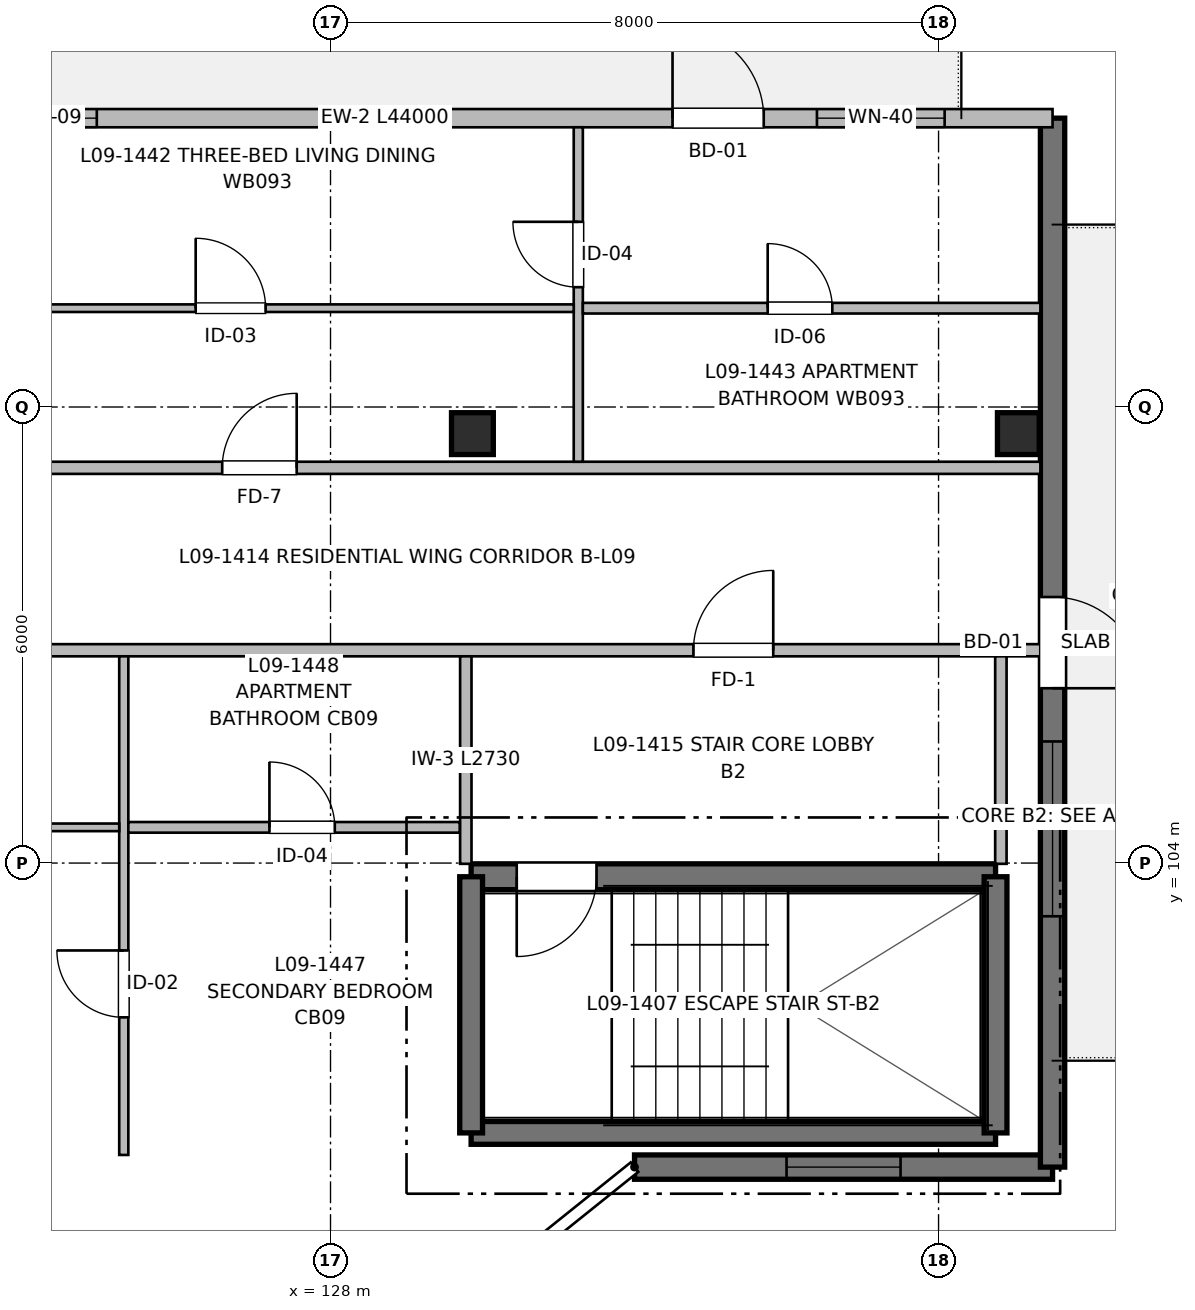
"""IFC4 building model, lengths in metres.
Left out: names, types, materials, properties, quantities, classifications, styles, units other than length and angle.
Written with IfcOpenShell. Run it as: python <this file> out.ifc"""

import sys

from ifc_helpers import new_model, si_unit, direction, frame, frame_2d, origin, origin_2d, place, context, subcontext, project, spatial, rectangle, extrude, element, fill, save


model = new_model("IFC4")
c1 = context("Model", 3, precision=1e-05, world=origin(), true_north=direction((0.0, 1.0)))
c2 = subcontext(c1, "Body", "Model", "MODEL_VIEW")
j1 = project(units=[si_unit("LENGTHUNIT", "METRE"), si_unit("PLANEANGLEUNIT", "RADIAN")], contexts=[c1])
p1 = place(None, origin())
s1 = spatial("IfcSite", under=j1, at=p1, CompositionType="ELEMENT")
p2 = place(p1, origin())
s2 = spatial("IfcBuilding", under=s1, at=p2, CompositionType="ELEMENT")
p3 = place(p2, frame((0.0, 0.0, 29.76)))
s3 = spatial("IfcBuildingStorey", under=s2, at=p3, CompositionType="ELEMENT", Elevation=29.76)
for number, where, z_axis, x_axis in (
    (1, (129.867, 109.65, 0.0), (0.0, 0.0, 1.0), (1.0, 0.0, 0.0)),
    (2, (137.05, 109.65, 0.0), (0.0, 0.0, 1.0), (1.0, 0.0, 0.0)),
):
    element("IfcColumn", number, at=place(p3, frame(where, z_axis=z_axis, x_axis=x_axis)), inside=s3, PredefinedType="COLUMN", context=c2, shape_type="SweptSolid", body=[
        extrude(rectangle(XDim=0.55, YDim=0.55, at=origin_2d()), origin(), (0.0, 0.0, 1.0), 3.2),
    ])
p4 = place(p3, frame((129.85, 100.45, 0.0), z_axis=(0.0, 0.0, 1.0), x_axis=(1.0, 0.0, 0.0)))
e3 = element("IfcWall", 3, at=p4, inside=s3, PredefinedType="SHEAR", context=c2, shape_type="SweptSolid", body=[
    extrude(rectangle(XDim=6.9, YDim=0.3, at=frame_2d((3.45, 0.0))), origin(), (0.0, 0.0, 1.0), 3.2),
])
p5 = place(p3, frame((136.75, 103.82, 0.0), z_axis=(0.0, 0.0, 1.0), x_axis=(-1.0, 0.0, 0.0)))
e4 = element("IfcWall", 4, at=p5, inside=s3, PredefinedType="SHEAR", context=c2, shape_type="SweptSolid", body=[
    extrude(rectangle(XDim=6.9, YDim=0.34, at=frame_2d((3.45, 0.0))), origin(), (0.0, 0.0, 1.0), 3.2),
])
p6 = place(p5, frame((5.25, 0.0, 0.0)))
e5 = element("IfcOpeningElement", 5, at=p6, cuts=e4, PredefinedType="OPENING", context=c2, shape_type="SweptSolid", body=[
    extrude(rectangle(XDim=1.05, YDim=2.15, at=frame_2d((0.525, 1.075))), frame((0.0, 0.18, 0.0), z_axis=(0.0, -1.0, 0.0), x_axis=(1.0, 0.0, 0.0)), (0.0, 0.0, 1.0), 0.36),
])
for number, where, z_axis, x_axis in (
    (6, (129.85, 103.82, 0.0), (0.0, 0.0, 1.0), (0.0, -1.0, 0.0)),
    (7, (136.75, 100.45, 0.0), (0.0, 0.0, 1.0), (0.0, 1.0, 0.0)),
):
    element("IfcWall", number, at=place(p3, frame(where, z_axis=z_axis, x_axis=x_axis)), inside=s3, PredefinedType="SHEAR", context=c2, shape_type="SweptSolid", body=[
        extrude(rectangle(XDim=3.37, YDim=0.3, at=frame_2d((1.685, 0.0))), origin(), (0.0, 0.0, 1.0), 3.2),
    ])
p7 = place(p3, frame((137.5, 100.0, 0.0), z_axis=(0.0, 0.0, 1.0), x_axis=(-1.0, 0.0, 0.0)))
e8 = element("IfcWall", 8, at=p7, inside=s3, PredefinedType="SHEAR", context=c2, shape_type="SweptSolid", body=[
    extrude(rectangle(XDim=5.5, YDim=0.32, at=frame_2d((2.75, 0.0))), origin(), (0.0, 0.0, 1.0), 2.98),
])
p8 = place(p7, frame((2.0, 0.0, 0.82)))
e9 = element("IfcOpeningElement", 9, at=p8, cuts=e8, PredefinedType="OPENING", context=c2, shape_type="SweptSolid", body=[
    extrude(rectangle(XDim=1.5, YDim=1.4, at=frame_2d((0.75, 0.7))), frame((0.0, 0.17, 0.0), z_axis=(0.0, -1.0, 0.0), x_axis=(1.0, 0.0, 0.0)), (0.0, 0.0, 1.0), 0.34),
])
p9 = place(p3, frame((137.5, 113.8, 0.0), z_axis=(0.0, 0.0, 1.0), x_axis=(0.0, -1.0, 0.0)))
e10 = element("IfcWall", 10, at=p9, inside=s3, PredefinedType="SHEAR", context=c2, shape_type="SweptSolid", body=[
    extrude(rectangle(XDim=13.8, YDim=0.32, at=frame_2d((6.9, 0.0))), origin(), (0.0, 0.0, 1.0), 2.98),
])
p10 = place(p9, frame((6.3, 0.0, 0.0)))
e11 = element("IfcOpeningElement", 11, at=p10, cuts=e10, PredefinedType="OPENING", context=c2, shape_type="SweptSolid", body=[
    extrude(rectangle(XDim=1.2, YDim=2.2, at=frame_2d((0.6, 1.1))), frame((0.0, 0.17, 0.0), z_axis=(0.0, -1.0, 0.0), x_axis=(1.0, 0.0, 0.0)), (0.0, 0.0, 1.0), 0.34),
])
p11 = place(p9, frame((8.2, 0.0, 0.57)))
e12 = element("IfcOpeningElement", 12, at=p11, cuts=e10, PredefinedType="OPENING", context=c2, shape_type="SweptSolid", body=[
    extrude(rectangle(XDim=2.3, YDim=1.65, at=frame_2d((1.15, 0.825))), frame((0.0, 0.17, 0.0), z_axis=(0.0, -1.0, 0.0), x_axis=(1.0, 0.0, 0.0)), (0.0, 0.0, 1.0), 0.34),
])
p12 = place(p3, frame((93.5, 113.8, 0.0), z_axis=(0.0, 0.0, 1.0), x_axis=(1.0, 0.0, 0.0)))
e13 = element("IfcWall", 13, at=p12, inside=s3, PredefinedType="SOLIDWALL", context=c2, shape_type="SweptSolid", body=[
    extrude(rectangle(XDim=44.0, YDim=0.24, at=frame_2d((22.0, 0.0))), origin(), (0.0, 0.0, 1.0), 2.98),
])
p13 = place(p12, frame((3.8, 0.0, 0.0)))
e14 = element("IfcOpeningElement", 14, at=p13, cuts=e13, PredefinedType="OPENING", context=c2, shape_type="SweptSolid", body=[
    extrude(rectangle(XDim=1.2, YDim=2.2, at=frame_2d((0.6, 1.1))), frame((0.0, 0.13, 0.0), z_axis=(0.0, -1.0, 0.0), x_axis=(1.0, 0.0, 0.0)), (0.0, 0.0, 1.0), 0.26),
])
p14 = place(p12, frame((5.7, 0.0, 0.57)))
e15 = element("IfcOpeningElement", 15, at=p14, cuts=e13, PredefinedType="OPENING", context=c2, shape_type="SweptSolid", body=[
    extrude(rectangle(XDim=2.3, YDim=1.65, at=frame_2d((1.15, 0.825))), frame((0.0, 0.13, 0.0), z_axis=(0.0, -1.0, 0.0), x_axis=(1.0, 0.0, 0.0)), (0.0, 0.0, 1.0), 0.26),
])
p15 = place(p12, frame((12.425, 0.0, 0.82)))
e16 = element("IfcOpeningElement", 16, at=p15, cuts=e13, PredefinedType="OPENING", context=c2, shape_type="SweptSolid", body=[
    extrude(rectangle(XDim=1.55, YDim=1.4, at=frame_2d((0.775, 0.7))), frame((0.0, 0.13, 0.0), z_axis=(0.0, -1.0, 0.0), x_axis=(1.0, 0.0, 0.0)), (0.0, 0.0, 1.0), 0.26),
])
p16 = place(p12, frame((21.4, 0.0, 0.0)))
e17 = element("IfcOpeningElement", 17, at=p16, cuts=e13, PredefinedType="OPENING", context=c2, shape_type="SweptSolid", body=[
    extrude(rectangle(XDim=1.2, YDim=2.2, at=frame_2d((0.6, 1.1))), frame((0.0, 0.13, 0.0), z_axis=(0.0, -1.0, 0.0), x_axis=(1.0, 0.0, 0.0)), (0.0, 0.0, 1.0), 0.26),
])
p17 = place(p12, frame((23.3, 0.0, 0.72)))
e18 = element("IfcOpeningElement", 18, at=p17, cuts=e13, PredefinedType="OPENING", context=c2, shape_type="SweptSolid", body=[
    extrude(rectangle(XDim=1.95, YDim=1.5, at=frame_2d((0.975, 0.75))), frame((0.0, 0.13, 0.0), z_axis=(0.0, -1.0, 0.0), x_axis=(1.0, 0.0, 0.0)), (0.0, 0.0, 1.0), 0.26),
])
p18 = place(p12, frame((30.175, 0.0, 0.87)))
e19 = element("IfcOpeningElement", 19, at=p18, cuts=e13, PredefinedType="OPENING", context=c2, shape_type="SweptSolid", body=[
    extrude(rectangle(XDim=1.25, YDim=1.35, at=frame_2d((0.625, 0.675))), frame((0.0, 0.13, 0.0), z_axis=(0.0, -1.0, 0.0), x_axis=(1.0, 0.0, 0.0)), (0.0, 0.0, 1.0), 0.26),
])
p19 = place(p12, frame((39.0, 0.0, 0.0)))
e20 = element("IfcOpeningElement", 20, at=p19, cuts=e13, PredefinedType="OPENING", context=c2, shape_type="SweptSolid", body=[
    extrude(rectangle(XDim=1.2, YDim=2.2, at=frame_2d((0.6, 1.1))), frame((0.0, 0.13, 0.0), z_axis=(0.0, -1.0, 0.0), x_axis=(1.0, 0.0, 0.0)), (0.0, 0.0, 1.0), 0.26),
])
p20 = place(p12, frame((40.9, 0.0, 0.72)))
e21 = element("IfcOpeningElement", 21, at=p20, cuts=e13, PredefinedType="OPENING", context=c2, shape_type="SweptSolid", body=[
    extrude(rectangle(XDim=1.68, YDim=1.5, at=frame_2d((0.84, 0.75))), frame((0.0, 0.13, 0.0), z_axis=(0.0, -1.0, 0.0), x_axis=(1.0, 0.0, 0.0)), (0.0, 0.0, 1.0), 0.26),
])
p21 = place(p3, frame((113.2, 106.8, 0.0), z_axis=(0.0, 0.0, 1.0), x_axis=(1.0, 0.0, 0.0)))
e22 = element("IfcWall", 22, at=p21, inside=s3, PredefinedType="PARTITIONING", context=c2, shape_type="SweptSolid", body=[
    extrude(rectangle(XDim=24.14, YDim=0.16, at=frame_2d((12.07, 0.0))), origin(), (0.0, 0.0, 1.0), 2.935),
])
p22 = place(p21, frame((19.575, 0.0, 0.0)))
e23 = element("IfcOpeningElement", 23, at=p22, cuts=e22, PredefinedType="OPENING", context=c2, shape_type="SweptSolid", body=[
    extrude(rectangle(XDim=1.05, YDim=2.15, at=frame_2d((0.525, 1.075))), frame((0.0, 0.09, 0.0), z_axis=(0.0, -1.0, 0.0), x_axis=(1.0, 0.0, 0.0)), (0.0, 0.0, 1.0), 0.18),
])
p23 = place(p21, frame((8.995, 0.0, 0.0)))
e24 = element("IfcOpeningElement", 24, at=p23, cuts=e22, PredefinedType="OPENING", context=c2, shape_type="SweptSolid", body=[
    extrude(rectangle(XDim=0.98, YDim=2.15, at=frame_2d((0.49, 1.075))), frame((0.0, 0.09, 0.0), z_axis=(0.0, -1.0, 0.0), x_axis=(1.0, 0.0, 0.0)), (0.0, 0.0, 1.0), 0.18),
])
p24 = place(p3, frame((93.66, 109.2, 0.0), z_axis=(0.0, 0.0, 1.0), x_axis=(1.0, 0.0, 0.0)))
e25 = element("IfcWall", 25, at=p24, inside=s3, PredefinedType="PARTITIONING", context=c2, shape_type="SweptSolid", body=[
    extrude(rectangle(XDim=43.68, YDim=0.16, at=frame_2d((21.84, 0.0))), origin(), (0.0, 0.0, 1.0), 2.935),
])
p25 = place(p24, frame((3.705, 0.0, 0.0)))
e26 = element("IfcOpeningElement", 26, at=p25, cuts=e25, PredefinedType="OPENING", context=c2, shape_type="SweptSolid", body=[
    extrude(rectangle(XDim=0.98, YDim=2.15, at=frame_2d((0.49, 1.075))), frame((0.0, 0.09, 0.0), z_axis=(0.0, -1.0, 0.0), x_axis=(1.0, 0.0, 0.0)), (0.0, 0.0, 1.0), 0.18),
])
p26 = place(p24, frame((18.33, 0.0, 0.0)))
e27 = element("IfcOpeningElement", 27, at=p26, cuts=e25, PredefinedType="OPENING", context=c2, shape_type="SweptSolid", body=[
    extrude(rectangle(XDim=0.98, YDim=2.15, at=frame_2d((0.49, 1.075))), frame((0.0, 0.09, 0.0), z_axis=(0.0, -1.0, 0.0), x_axis=(1.0, 0.0, 0.0)), (0.0, 0.0, 1.0), 0.18),
])
p27 = place(p24, frame((32.915, 0.0, 0.0)))
e28 = element("IfcOpeningElement", 28, at=p27, cuts=e25, PredefinedType="OPENING", context=c2, shape_type="SweptSolid", body=[
    extrude(rectangle(XDim=0.98, YDim=2.15, at=frame_2d((0.49, 1.075))), frame((0.0, 0.09, 0.0), z_axis=(0.0, -1.0, 0.0), x_axis=(1.0, 0.0, 0.0)), (0.0, 0.0, 1.0), 0.18),
])
for number, where, z_axis, x_axis in (
    (29, (129.78, 103.99, 0.0), (0.0, 0.0, 1.0), (0.0, 1.0, 0.0)),
    (30, (136.82, 103.99, 0.0), (0.0, 0.0, 1.0), (0.0, 1.0, 0.0)),
):
    element("IfcWall", number, at=place(p3, frame(where, z_axis=z_axis, x_axis=x_axis)), inside=s3, PredefinedType="PARTITIONING", context=c2, shape_type="SweptSolid", body=[
        extrude(rectangle(XDim=2.73, YDim=0.15, at=frame_2d((1.365, 0.0))), origin(), (0.0, 0.0, 1.0), 2.935),
    ])
p28 = place(p3, frame((131.26, 109.28, 0.0), z_axis=(0.0, 0.0, 1.0), x_axis=(0.0, 1.0, 0.0)))
e31 = element("IfcWall", 31, at=p28, inside=s3, PredefinedType="PARTITIONING", context=c2, shape_type="SweptSolid", body=[
    extrude(rectangle(XDim=4.4, YDim=0.12, at=frame_2d((2.2, 0.0))), origin(), (0.0, 0.0, 1.0), 2.935),
])
p29 = place(p28, frame((2.296, 0.0, 0.0)))
e32 = element("IfcOpeningElement", 32, at=p29, cuts=e31, PredefinedType="OPENING", context=c2, shape_type="SweptSolid", body=[
    extrude(rectangle(XDim=0.86, YDim=2.1, at=frame_2d((0.43, 1.05))), frame((0.0, 0.07, 0.0), z_axis=(0.0, -1.0, 0.0), x_axis=(1.0, 0.0, 0.0)), (0.0, 0.0, 1.0), 0.14),
])
p30 = place(p3, frame((131.32, 111.3, 0.0), z_axis=(0.0, 0.0, 1.0), x_axis=(1.0, 0.0, 0.0)))
e33 = element("IfcWall", 33, at=p30, inside=s3, PredefinedType="PARTITIONING", context=c2, shape_type="SweptSolid", body=[
    extrude(rectangle(XDim=6.02, YDim=0.14, at=frame_2d((3.01, 0.0))), origin(), (0.0, 0.0, 1.0), 2.935),
])
p31 = place(p30, frame((2.432, 0.0, 0.0)))
e34 = element("IfcOpeningElement", 34, at=p31, cuts=e33, PredefinedType="OPENING", context=c2, shape_type="SweptSolid", body=[
    extrude(rectangle(XDim=0.85, YDim=2.05, at=frame_2d((0.425, 1.025))), frame((0.0, 0.08, 0.0), z_axis=(0.0, -1.0, 0.0), x_axis=(1.0, 0.0, 0.0)), (0.0, 0.0, 1.0), 0.16),
])
p32 = place(p3, frame((122.87, 111.3, 0.0), z_axis=(0.0, 0.0, 1.0), x_axis=(1.0, 0.0, 0.0)))
e35 = element("IfcWall", 35, at=p32, inside=s3, PredefinedType="PARTITIONING", context=c2, shape_type="SweptSolid", body=[
    extrude(rectangle(XDim=8.33, YDim=0.1, at=frame_2d((4.165, 0.0))), origin(), (0.0, 0.0, 1.0), 2.935),
])
p33 = place(p32, frame((3.356, 0.0, 0.0)))
e36 = element("IfcOpeningElement", 36, at=p33, cuts=e35, PredefinedType="OPENING", context=c2, shape_type="SweptSolid", body=[
    extrude(rectangle(XDim=0.92, YDim=2.1, at=frame_2d((0.46, 1.05))), frame((0.0, 0.06, 0.0), z_axis=(0.0, -1.0, 0.0), x_axis=(1.0, 0.0, 0.0)), (0.0, 0.0, 1.0), 0.12),
])
p34 = place(p3, frame((125.28, 100.16, 0.0), z_axis=(0.0, 0.0, 1.0), x_axis=(0.0, 1.0, 0.0)))
e37 = element("IfcWall", 37, at=p34, inside=s3, PredefinedType="PARTITIONING", context=c2, shape_type="SweptSolid", body=[
    extrude(rectangle(XDim=6.56, YDim=0.12, at=frame_2d((3.28, 0.0))), origin(), (0.0, 0.0, 1.0), 2.935),
])
p35 = place(p34, frame((1.81, 0.0, 0.0)))
e38 = element("IfcOpeningElement", 38, at=p35, cuts=e37, PredefinedType="OPENING", context=c2, shape_type="SweptSolid", body=[
    extrude(rectangle(XDim=0.88, YDim=2.1, at=frame_2d((0.44, 1.05))), frame((0.0, 0.07, 0.0), z_axis=(0.0, -1.0, 0.0), x_axis=(1.0, 0.0, 0.0)), (0.0, 0.0, 1.0), 0.14),
])
p36 = place(p3, frame((125.34, 104.47, 0.0), z_axis=(0.0, 0.0, 1.0), x_axis=(1.0, 0.0, 0.0)))
e39 = element("IfcWall", 39, at=p36, inside=s3, PredefinedType="PARTITIONING", context=c2, shape_type="SweptSolid", body=[
    extrude(rectangle(XDim=4.36, YDim=0.14, at=frame_2d((2.18, 0.0))), origin(), (0.0, 0.0, 1.0), 2.935),
])
p37 = place(p36, frame((1.856, 0.0, 0.0)))
e40 = element("IfcOpeningElement", 40, at=p37, cuts=e39, PredefinedType="OPENING", context=c2, shape_type="SweptSolid", body=[
    extrude(rectangle(XDim=0.86, YDim=2.1, at=frame_2d((0.43, 1.05))), frame((0.0, 0.08, 0.0), z_axis=(0.0, -1.0, 0.0), x_axis=(1.0, 0.0, 0.0)), (0.0, 0.0, 1.0), 0.16),
])
p38 = place(p3, frame((120.09, 104.47, 0.0), z_axis=(0.0, 0.0, 1.0), x_axis=(1.0, 0.0, 0.0)))
e41 = element("IfcWall", 41, at=p38, inside=s3, PredefinedType="PARTITIONING", context=c2, shape_type="SweptSolid", body=[
    extrude(rectangle(XDim=5.13, YDim=0.1, at=frame_2d((2.565, 0.0))), origin(), (0.0, 0.0, 1.0), 2.935),
])
p39 = place(p38, frame((2.18, 0.0, 0.0)))
e42 = element("IfcOpeningElement", 42, at=p39, cuts=e41, PredefinedType="OPENING", context=c2, shape_type="SweptSolid", body=[
    extrude(rectangle(XDim=0.92, YDim=2.1, at=frame_2d((0.46, 1.05))), frame((0.0, 0.06, 0.0), z_axis=(0.0, -1.0, 0.0), x_axis=(1.0, 0.0, 0.0)), (0.0, 0.0, 1.0), 0.12),
])
p40 = place(p6, origin())
e43 = element("IfcDoor", 43, at=p40, inside=s3, OperationType="SINGLE_SWING_RIGHT", PredefinedType="DOOR", context=c2, shape_type="SweptSolid", body=[
    extrude(rectangle(XDim=1.05, YDim=2.15, at=frame_2d((0.525, 1.075))), frame((0.0, 0.025, 0.0), z_axis=(0.0, -1.0, 0.0), x_axis=(1.0, 0.0, 0.0)), (0.0, 0.0, 1.0), 0.05),
])
fill(e5, e43)
p41 = place(p8, origin())
e44 = element("IfcWindow", 44, at=p41, inside=s3, PartitioningType="SINGLE_PANEL", PredefinedType="WINDOW", context=c2, shape_type="SweptSolid", body=[
    extrude(rectangle(XDim=1.5, YDim=1.4, at=frame_2d((0.75, 0.7))), frame((0.0, 0.03, 0.0), z_axis=(0.0, -1.0, 0.0), x_axis=(1.0, 0.0, 0.0)), (0.0, 0.0, 1.0), 0.06),
])
fill(e9, e44)
p42 = place(p10, origin())
e45 = element("IfcDoor", 45, at=p42, inside=s3, OperationType="SINGLE_SWING_RIGHT", PredefinedType="DOOR", context=c2, shape_type="SweptSolid", body=[
    extrude(rectangle(XDim=1.2, YDim=2.2, at=frame_2d((0.6, 1.1))), frame((0.0, 0.025, 0.0), z_axis=(0.0, -1.0, 0.0), x_axis=(1.0, 0.0, 0.0)), (0.0, 0.0, 1.0), 0.05),
])
fill(e11, e45)
p43 = place(p11, origin())
e46 = element("IfcWindow", 46, at=p43, inside=s3, PartitioningType="SINGLE_PANEL", PredefinedType="WINDOW", context=c2, shape_type="SweptSolid", body=[
    extrude(rectangle(XDim=2.3, YDim=1.65, at=frame_2d((1.15, 0.825))), frame((0.0, 0.03, 0.0), z_axis=(0.0, -1.0, 0.0), x_axis=(1.0, 0.0, 0.0)), (0.0, 0.0, 1.0), 0.06),
])
fill(e12, e46)
p44 = place(p18, origin())
e47 = element("IfcWindow", 47, at=p44, inside=s3, PartitioningType="SINGLE_PANEL", PredefinedType="WINDOW", context=c2, shape_type="SweptSolid", body=[
    extrude(rectangle(XDim=1.25, YDim=1.35, at=frame_2d((0.625, 0.675))), frame((0.0, 0.03, 0.0), z_axis=(0.0, -1.0, 0.0), x_axis=(1.0, 0.0, 0.0)), (0.0, 0.0, 1.0), 0.06),
])
fill(e19, e47)
p45 = place(p19, origin())
e48 = element("IfcDoor", 48, at=p45, inside=s3, OperationType="SINGLE_SWING_LEFT", PredefinedType="DOOR", context=c2, shape_type="SweptSolid", body=[
    extrude(rectangle(XDim=1.2, YDim=2.2, at=frame_2d((0.6, 1.1))), frame((0.0, 0.025, 0.0), z_axis=(0.0, -1.0, 0.0), x_axis=(1.0, 0.0, 0.0)), (0.0, 0.0, 1.0), 0.05),
])
fill(e20, e48)
p46 = place(p20, origin())
e49 = element("IfcWindow", 49, at=p46, inside=s3, PartitioningType="SINGLE_PANEL", PredefinedType="WINDOW", context=c2, shape_type="SweptSolid", body=[
    extrude(rectangle(XDim=1.68, YDim=1.5, at=frame_2d((0.84, 0.75))), frame((0.0, 0.03, 0.0), z_axis=(0.0, -1.0, 0.0), x_axis=(1.0, 0.0, 0.0)), (0.0, 0.0, 1.0), 0.06),
])
fill(e21, e49)
p47 = place(p22, origin())
e50 = element("IfcDoor", 50, at=p47, inside=s3, OperationType="SINGLE_SWING_RIGHT", PredefinedType="DOOR", context=c2, shape_type="SweptSolid", body=[
    extrude(rectangle(XDim=1.05, YDim=2.15, at=frame_2d((0.525, 1.075))), frame((0.0, 0.025, 0.0), z_axis=(0.0, -1.0, 0.0), x_axis=(1.0, 0.0, 0.0)), (0.0, 0.0, 1.0), 0.05),
])
fill(e23, e50)
p48 = place(p27, origin())
e51 = element("IfcDoor", 51, at=p48, inside=s3, OperationType="SINGLE_SWING_RIGHT", PredefinedType="DOOR", context=c2, shape_type="SweptSolid", body=[
    extrude(rectangle(XDim=0.98, YDim=2.15, at=frame_2d((0.49, 1.075))), frame((0.0, 0.025, 0.0), z_axis=(0.0, -1.0, 0.0), x_axis=(1.0, 0.0, 0.0)), (0.0, 0.0, 1.0), 0.05),
])
fill(e28, e51)
p49 = place(p33, origin())
e52 = element("IfcDoor", 52, at=p49, inside=s3, OperationType="SINGLE_SWING_LEFT", PredefinedType="DOOR", context=c2, shape_type="SweptSolid", body=[
    extrude(rectangle(XDim=0.92, YDim=2.1, at=frame_2d((0.46, 1.05))), frame((0.0, 0.025, 0.0), z_axis=(0.0, -1.0, 0.0), x_axis=(1.0, 0.0, 0.0)), (0.0, 0.0, 1.0), 0.05),
])
fill(e36, e52)
p50 = place(p29, origin())
e53 = element("IfcDoor", 53, at=p50, inside=s3, OperationType="SINGLE_SWING_RIGHT", PredefinedType="DOOR", context=c2, shape_type="SweptSolid", body=[
    extrude(rectangle(XDim=0.86, YDim=2.1, at=frame_2d((0.43, 1.05))), frame((0.0, 0.025, 0.0), z_axis=(0.0, -1.0, 0.0), x_axis=(1.0, 0.0, 0.0)), (0.0, 0.0, 1.0), 0.05),
])
fill(e32, e53)
p51 = place(p31, origin())
e54 = element("IfcDoor", 54, at=p51, inside=s3, OperationType="SINGLE_SWING_LEFT", PredefinedType="DOOR", context=c2, shape_type="SweptSolid", body=[
    extrude(rectangle(XDim=0.85, YDim=2.05, at=frame_2d((0.425, 1.025))), frame((0.0, 0.025, 0.0), z_axis=(0.0, -1.0, 0.0), x_axis=(1.0, 0.0, 0.0)), (0.0, 0.0, 1.0), 0.05),
])
fill(e34, e54)
p52 = place(p35, origin())
e55 = element("IfcDoor", 55, at=p52, inside=s3, OperationType="SINGLE_SWING_RIGHT", PredefinedType="DOOR", context=c2, shape_type="SweptSolid", body=[
    extrude(rectangle(XDim=0.88, YDim=2.1, at=frame_2d((0.44, 1.05))), frame((0.0, 0.025, 0.0), z_axis=(0.0, -1.0, 0.0), x_axis=(1.0, 0.0, 0.0)), (0.0, 0.0, 1.0), 0.05),
])
fill(e38, e55)
p53 = place(p37, origin())
e56 = element("IfcDoor", 56, at=p53, inside=s3, OperationType="SINGLE_SWING_LEFT", PredefinedType="DOOR", context=c2, shape_type="SweptSolid", body=[
    extrude(rectangle(XDim=0.86, YDim=2.1, at=frame_2d((0.43, 1.05))), frame((0.0, 0.025, 0.0), z_axis=(0.0, -1.0, 0.0), x_axis=(1.0, 0.0, 0.0)), (0.0, 0.0, 1.0), 0.05),
])
fill(e40, e56)
save(model, sys.argv[1])
